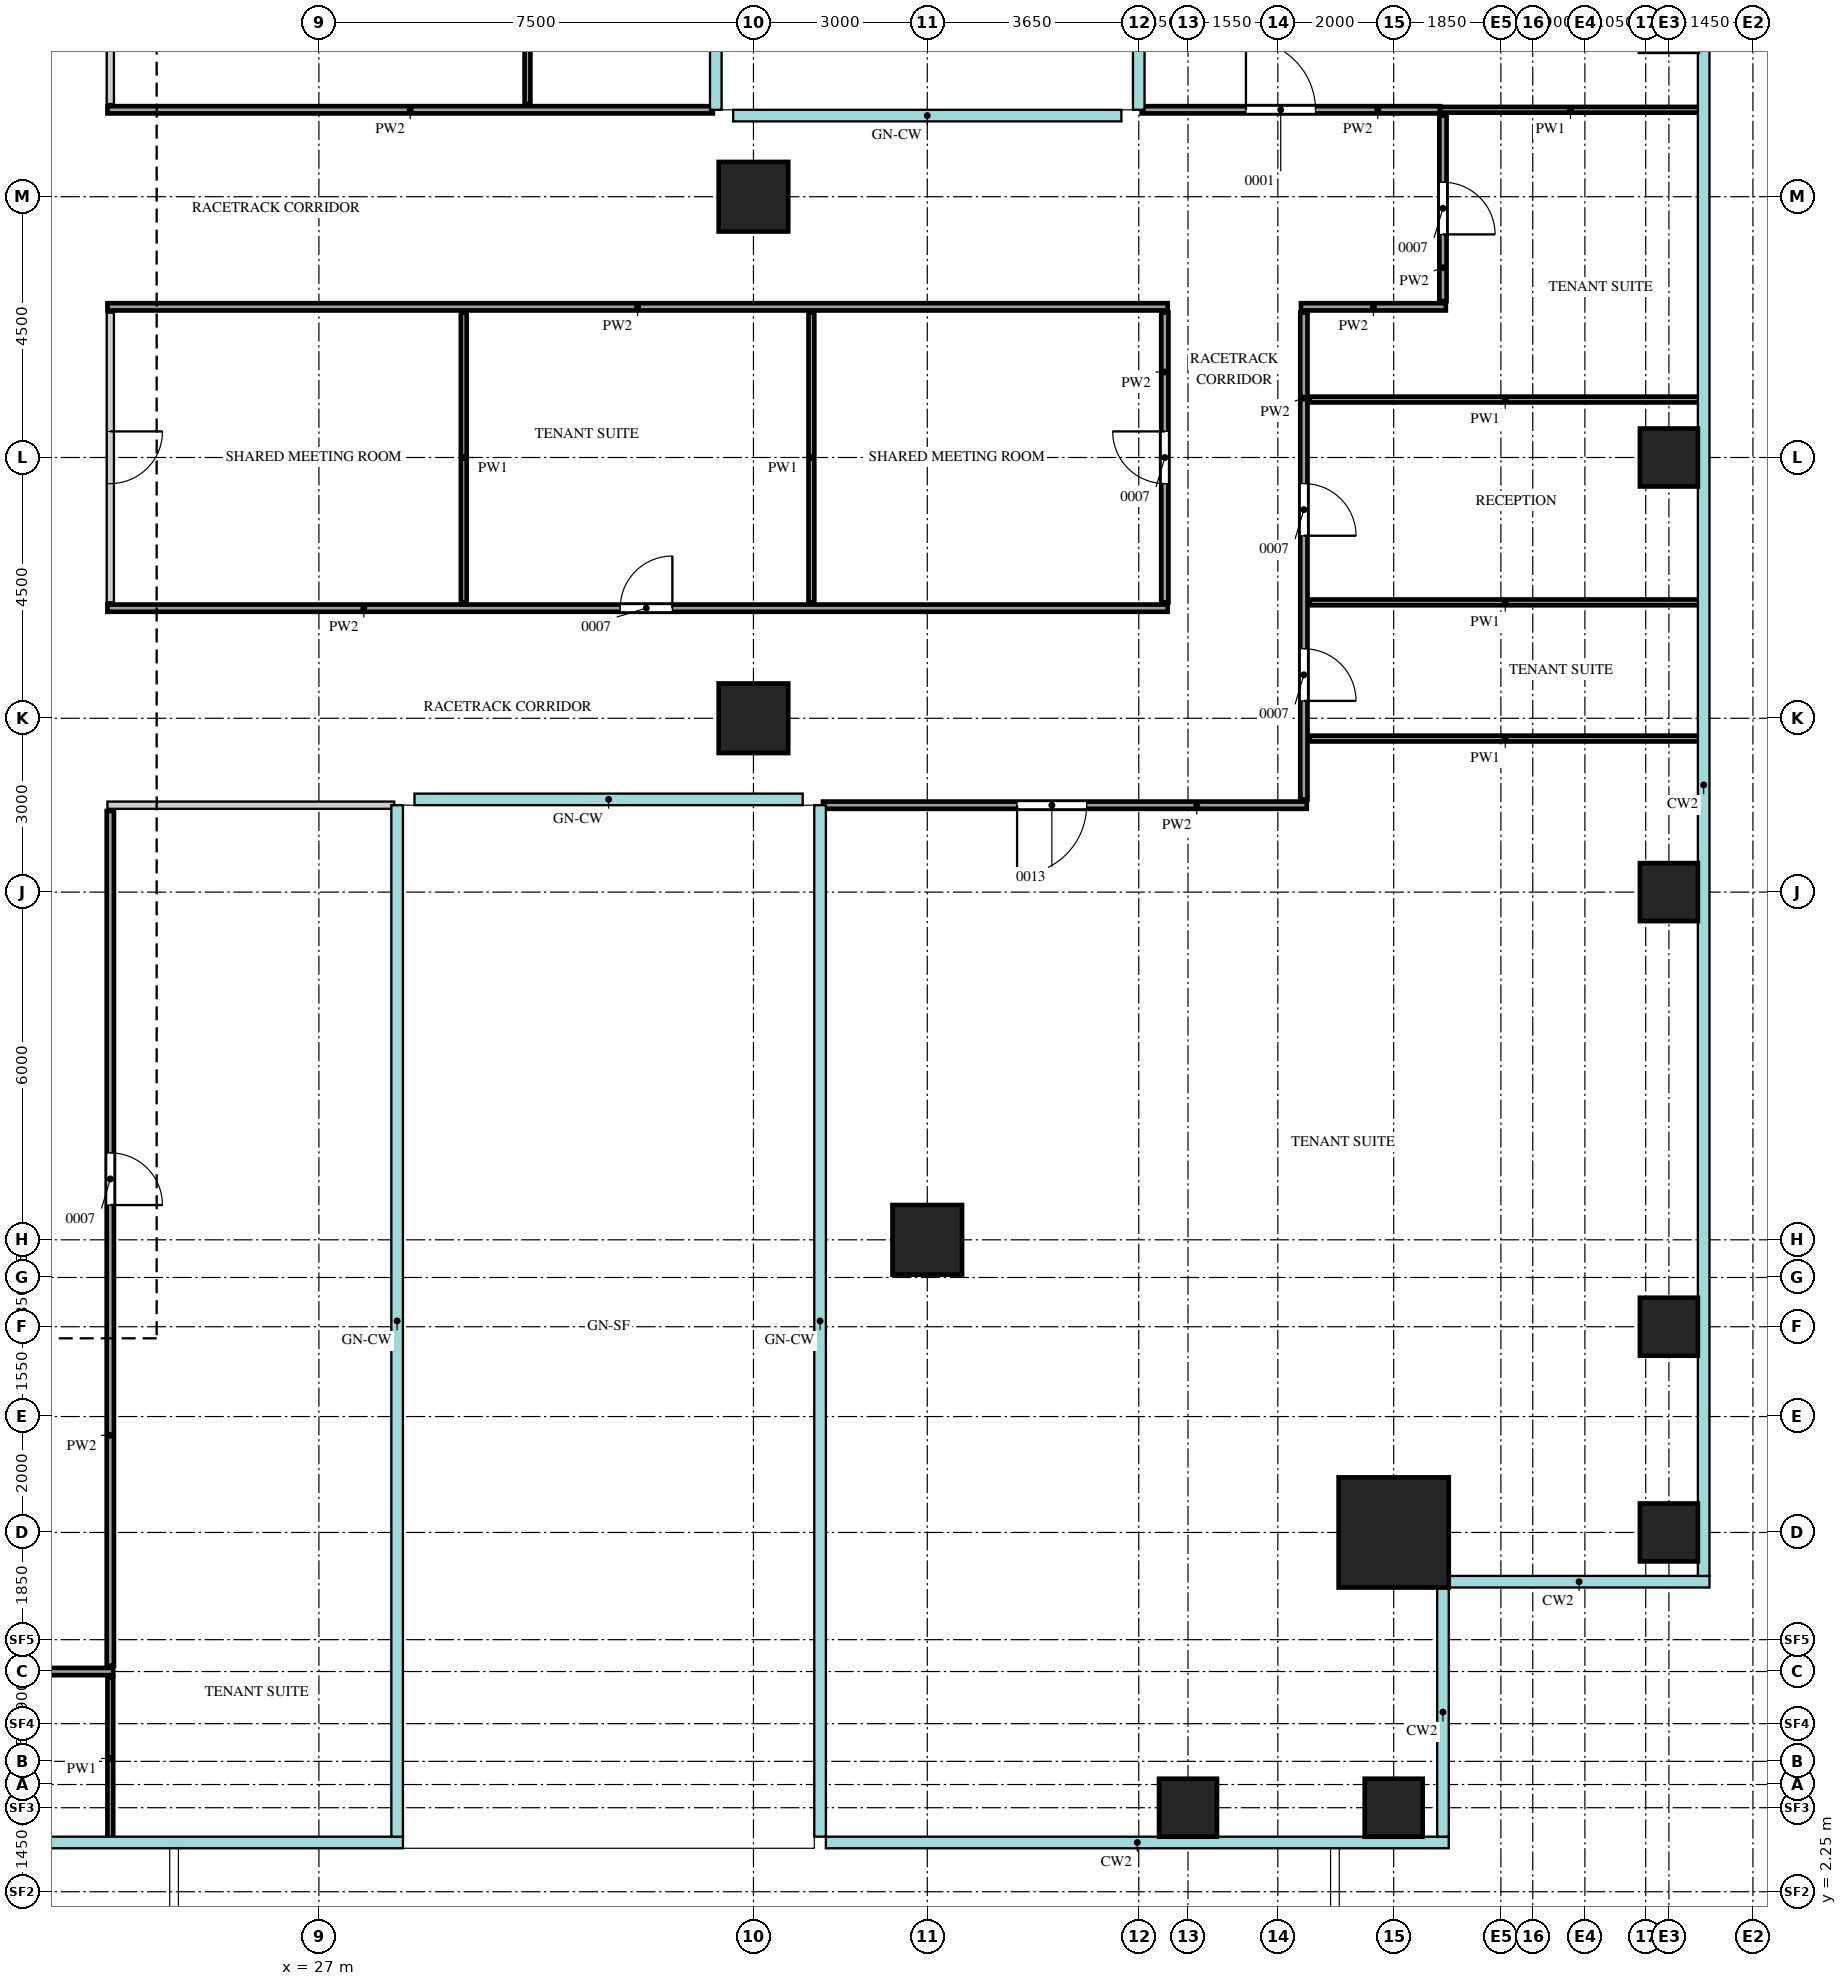
"""IFC4 building model, lengths in metres.
Left out: names, types, materials, properties, quantities, classifications, styles, units other than length and angle.
Written with IfcOpenShell. Run it as: python <this file> out.ifc"""

import sys

from ifc_helpers import new_model, si_unit, direction, frame, frame_2d, origin, origin_2d, place, context, subcontext, project, spatial, rectangle, extrude, source, transform, mapped, element, fill, save


model = new_model("IFC4")
c1 = context("Model", 3, precision=1e-05, world=origin(), true_north=direction((0.0, 1.0)))
c2 = subcontext(c1, "Body", "Model", "MODEL_VIEW")
j1 = project(units=[si_unit("LENGTHUNIT", "METRE"), si_unit("PLANEANGLEUNIT", "RADIAN")], contexts=[c1])
p1 = place(None, origin())
s1 = spatial("IfcSite", under=j1, at=p1, CompositionType="ELEMENT")
p2 = place(p1, origin())
s2 = spatial("IfcBuilding", under=s1, at=p2, CompositionType="ELEMENT")
p3 = place(p2, frame((0.0, 0.0, 184.7)))
s3 = spatial("IfcBuildingStorey", under=s2, at=p3, CompositionType="ELEMENT", Elevation=184.7)
m1 = source(origin(), c2, "Body", "SweptSolid", [
    extrude(rectangle(XDim=1.9, YDim=1.9, at=origin_2d()), origin(), (0.0, 0.0, 1.0), 4.0),
])
p4 = place(p3, frame((45.55, 8.45, 0.0), z_axis=(0.0, 0.0, 1.0), x_axis=(1.0, 0.0, 0.0)))
e1 = element("IfcColumn", 1, at=p4, inside=s3, PredefinedType="COLUMN", context=c2, shape_type="MappedRepresentation", body=[
    mapped(m1, transform((0.0, 0.0, 0.0))),
])
m2 = source(origin(), c2, "Body", "SweptSolid", [
    extrude(rectangle(XDim=1.0, YDim=1.0, at=origin_2d()), origin(), (0.0, 0.0, 1.0), 3.75),
])
for number, where, z_axis, x_axis in (
    (2, (42.0, 3.7, 0.0), (0.0, 0.0, 1.0), (1.0, 0.0, 0.0)),
    (3, (45.55, 3.7, 0.0), (0.0, 0.0, 1.0), (1.0, 0.0, 0.0)),
    (4, (50.3, 8.45, 0.0), (0.0, 0.0, 1.0), (1.0, 0.0, 0.0)),
    (5, (50.3, 12.0, 0.0), (0.0, 0.0, 1.0), (1.0, 0.0, 0.0)),
    (6, (50.3, 19.5, 0.0), (0.0, 0.0, 1.0), (1.0, 0.0, 0.0)),
    (7, (50.3, 27.0, 0.0), (0.0, 0.0, 1.0), (1.0, 0.0, 0.0)),
):
    element("IfcColumn", number, at=place(p3, frame(where, z_axis=z_axis, x_axis=x_axis)), inside=s3, PredefinedType="COLUMN", context=c2, shape_type="MappedRepresentation", body=[
        mapped(m2, transform((0.0, 0.0, 0.0))),
    ])
m3 = source(origin(), c2, "Body", "SweptSolid", [
    extrude(rectangle(XDim=1.2, YDim=1.2, at=origin_2d()), origin(), (0.0, 0.0, 1.0), 3.75),
])
for number, where, z_axis, x_axis in (
    (8, (37.5, 13.5, 0.0), (0.0, 0.0, 1.0), (1.0, 0.0, 0.0)),
    (9, (34.5, 22.5, 0.0), (0.0, 0.0, 1.0), (1.0, 0.0, 0.0)),
    (10, (34.5, 31.5, 0.0), (0.0, 0.0, 1.0), (1.0, 0.0, 0.0)),
):
    element("IfcColumn", number, at=place(p3, frame(where, z_axis=z_axis, x_axis=x_axis)), inside=s3, PredefinedType="COLUMN", context=c2, shape_type="MappedRepresentation", body=[
        mapped(m3, transform((0.0, 0.0, 0.0))),
    ])
m4 = source(origin(), c2, "Body", "SweptSolid", [
    extrude(rectangle(XDim=2.8, YDim=0.1, at=frame_2d((1.4, 0.0))), origin(), (0.0, 0.0, 1.0), 3.8),
])
p5 = place(p3, frame((23.4, 3.15, 0.0), z_axis=(0.0, 0.0, 1.0), x_axis=(0.0, 1.0, 0.0)))
e11 = element("IfcWall", 11, at=p5, inside=s3, PredefinedType="PARTITIONING", context=c2, shape_type="MappedRepresentation", body=[
    mapped(m4, transform((0.0, 0.0, 0.0))),
])
m5 = source(origin(), c2, "Body", "SweptSolid", [
    extrude(rectangle(XDim=15.8, YDim=0.125, at=frame_2d((7.9, 0.0))), origin(), (0.0, 0.0, 1.0), 3.8),
])
p6 = place(p3, frame((7.65, 6.05, 0.0), z_axis=(0.0, 0.0, 1.0), x_axis=(1.0, 0.0, 0.0)))
e12 = element("IfcWall", 12, at=p6, inside=s3, PredefinedType="PARTITIONING", context=c2, shape_type="MappedRepresentation", body=[
    mapped(m5, transform((0.0, 0.0, 0.0))),
])
m6 = source(origin(), c2, "Body", "SweptSolid", [
    extrude(rectangle(XDim=0.9, YDim=2.1, at=frame_2d((0.45, 1.05))), frame((0.0, 0.073, 0.0), z_axis=(0.0, -1.0, 0.0), x_axis=(1.0, 0.0, 0.0)), (0.0, 0.0, 1.0), 0.145),
])
p7 = place(p6, frame((1.8, 0.0, 0.0)))
e13 = element("IfcOpeningElement", 13, at=p7, cuts=e12, PredefinedType="OPENING", context=c2, shape_type="MappedRepresentation", body=[
    mapped(m6, transform((0.0, 0.0, 0.0))),
])
p8 = place(p6, frame((8.85, 0.0, 0.0)))
e14 = element("IfcOpeningElement", 14, at=p8, cuts=e12, PredefinedType="OPENING", context=c2, shape_type="MappedRepresentation", body=[
    mapped(m6, transform((0.0, 0.0, 0.0))),
])
m7 = source(origin(), c2, "Body", "SweptSolid", [
    extrude(rectangle(XDim=14.75, YDim=0.125, at=frame_2d((7.375, 0.0))), origin(), (0.0, 0.0, 1.0), 3.8),
])
p9 = place(p3, frame((23.4, 6.15, 0.0), z_axis=(0.0, 0.0, 1.0), x_axis=(0.0, 1.0, 0.0)))
e15 = element("IfcWall", 15, at=p9, inside=s3, PredefinedType="PARTITIONING", context=c2, shape_type="MappedRepresentation", body=[
    mapped(m7, transform((0.0, 0.0, 0.0))),
])
p10 = place(p9, frame((7.95, 0.0, 0.0)))
e16 = element("IfcOpeningElement", 16, at=p10, cuts=e15, PredefinedType="OPENING", context=c2, shape_type="MappedRepresentation", body=[
    mapped(m6, transform((0.0, 0.0, 0.0))),
])
m8 = source(origin(), c2, "Body", "SweptSolid", [
    extrude(rectangle(XDim=4.95, YDim=0.125, at=frame_2d((2.475, 0.0))), origin(), (0.0, 0.0, 1.0), 3.8),
])
p11 = place(p3, frame((23.35, 21.0, 0.0), z_axis=(0.0, 0.0, 1.0), x_axis=(1.0, 0.0, 0.0)))
e17 = element("IfcWall", 17, at=p11, inside=s3, PredefinedType="PARTITIONING", context=c2, shape_type="MappedRepresentation", body=[
    mapped(m8, transform((0.0, 0.0, 0.0))),
])
m9 = source(origin(), c2, "Body", "SweptSolid", [
    extrude(rectangle(XDim=8.35, YDim=0.125, at=frame_2d((4.175, 0.0))), origin(), (0.0, 0.0, 1.0), 3.8),
])
p12 = place(p3, frame((35.7, 21.0, 0.0), z_axis=(0.0, 0.0, 1.0), x_axis=(1.0, 0.0, 0.0)))
e18 = element("IfcWall", 18, at=p12, inside=s3, PredefinedType="PARTITIONING", context=c2, shape_type="MappedRepresentation", body=[
    mapped(m9, transform((0.0, 0.0, 0.0))),
])
m10 = source(origin(), c2, "Body", "SweptSolid", [
    extrude(rectangle(XDim=1.2, YDim=2.1, at=frame_2d((0.6, 1.05))), frame((0.0, 0.073, 0.0), z_axis=(0.0, -1.0, 0.0), x_axis=(1.0, 0.0, 0.0)), (0.0, 0.0, 1.0), 0.145),
])
p13 = place(p12, frame((3.35, 0.0, 0.0)))
e19 = element("IfcOpeningElement", 19, at=p13, cuts=e18, PredefinedType="OPENING", context=c2, shape_type="MappedRepresentation", body=[
    mapped(m10, transform((0.0, 0.0, 0.0))),
])
m11 = source(origin(), c2, "Body", "SweptSolid", [
    extrude(rectangle(XDim=8.4, YDim=0.125, at=frame_2d((4.2, 0.0))), origin(), (0.0, 0.0, 1.0), 3.8),
])
p14 = place(p3, frame((44.0, 21.1, 0.0), z_axis=(0.0, 0.0, 1.0), x_axis=(0.0, 1.0, 0.0)))
e20 = element("IfcWall", 20, at=p14, inside=s3, PredefinedType="PARTITIONING", context=c2, shape_type="MappedRepresentation", body=[
    mapped(m11, transform((0.0, 0.0, 0.0))),
])
p15 = place(p14, frame((1.7, 0.0, 0.0)))
e21 = element("IfcOpeningElement", 21, at=p15, cuts=e20, PredefinedType="OPENING", context=c2, shape_type="MappedRepresentation", body=[
    mapped(m6, transform((0.0, 0.0, 0.0))),
])
p16 = place(p14, frame((4.55, 0.0, 0.0)))
e22 = element("IfcOpeningElement", 22, at=p16, cuts=e20, PredefinedType="OPENING", context=c2, shape_type="MappedRepresentation", body=[
    mapped(m6, transform((0.0, 0.0, 0.0))),
])
m12 = source(origin(), c2, "Body", "SweptSolid", [
    extrude(rectangle(XDim=6.75, YDim=0.1, at=frame_2d((3.375, 0.0))), origin(), (0.0, 0.0, 1.0), 3.8),
])
p17 = place(p3, frame((44.1, 22.15, 0.0), z_axis=(0.0, 0.0, 1.0), x_axis=(1.0, 0.0, 0.0)))
e23 = element("IfcWall", 23, at=p17, inside=s3, PredefinedType="PARTITIONING", context=c2, shape_type="MappedRepresentation", body=[
    mapped(m12, transform((0.0, 0.0, 0.0))),
])
m13 = source(origin(), c2, "Body", "SweptSolid", [
    extrude(rectangle(XDim=18.3, YDim=0.125, at=frame_2d((9.15, 0.0))), origin(), (0.0, 0.0, 1.0), 3.8),
])
p18 = place(p3, frame((23.35, 24.4, 0.0), z_axis=(0.0, 0.0, 1.0), x_axis=(1.0, 0.0, 0.0)))
e24 = element("IfcWall", 24, at=p18, inside=s3, PredefinedType="PARTITIONING", context=c2, shape_type="MappedRepresentation", body=[
    mapped(m13, transform((0.0, 0.0, 0.0))),
])
p19 = place(p18, frame((8.85, 0.0, 0.0)))
e25 = element("IfcOpeningElement", 25, at=p19, cuts=e24, PredefinedType="OPENING", context=c2, shape_type="MappedRepresentation", body=[
    mapped(m6, transform((0.0, 0.0, 0.0))),
])
m14 = source(origin(), c2, "Body", "SweptSolid", [
    extrude(rectangle(XDim=5.0, YDim=0.125, at=frame_2d((2.5, 0.0))), origin(), (0.0, 0.0, 1.0), 3.8),
])
p20 = place(p3, frame((23.4, 24.5, 0.0), z_axis=(0.0, 0.0, 1.0), x_axis=(0.0, 1.0, 0.0)))
e26 = element("IfcWall", 26, at=p20, inside=s3, PredefinedType="PARTITIONING", context=c2, shape_type="MappedRepresentation", body=[
    mapped(m14, transform((0.0, 0.0, 0.0))),
])
p21 = place(p20, frame((2.05, 0.0, 0.0)))
e27 = element("IfcOpeningElement", 27, at=p21, cuts=e26, PredefinedType="OPENING", context=c2, shape_type="MappedRepresentation", body=[
    mapped(m6, transform((0.0, 0.0, 0.0))),
])
m15 = source(origin(), c2, "Body", "SweptSolid", [
    extrude(rectangle(XDim=5.0, YDim=0.1, at=frame_2d((2.5, 0.0))), origin(), (0.0, 0.0, 1.0), 3.8),
])
for number, where, z_axis, x_axis in (
    (28, (29.5, 24.5, 0.0), (0.0, 0.0, 1.0), (0.0, 1.0, 0.0)),
    (29, (35.5, 24.5, 0.0), (0.0, 0.0, 1.0), (0.0, 1.0, 0.0)),
):
    element("IfcWall", number, at=place(p3, frame(where, z_axis=z_axis, x_axis=x_axis)), inside=s3, PredefinedType="PARTITIONING", context=c2, shape_type="MappedRepresentation", body=[
        mapped(m15, transform((0.0, 0.0, 0.0))),
    ])
p22 = place(p3, frame((41.6, 24.5, 0.0), z_axis=(0.0, 0.0, 1.0), x_axis=(0.0, 1.0, 0.0)))
e30 = element("IfcWall", 30, at=p22, inside=s3, PredefinedType="PARTITIONING", context=c2, shape_type="MappedRepresentation", body=[
    mapped(m14, transform((0.0, 0.0, 0.0))),
])
p23 = place(p22, frame((2.05, 0.0, 0.0)))
e31 = element("IfcOpeningElement", 31, at=p23, cuts=e30, PredefinedType="OPENING", context=c2, shape_type="MappedRepresentation", body=[
    mapped(m6, transform((0.0, 0.0, 0.0))),
])
for number, where, z_axis, x_axis in (
    (32, (44.1, 24.5, 0.0), (0.0, 0.0, 1.0), (1.0, 0.0, 0.0)),
    (33, (44.1, 28.0, 0.0), (0.0, 0.0, 1.0), (1.0, 0.0, 0.0)),
):
    element("IfcWall", number, at=place(p3, frame(where, z_axis=z_axis, x_axis=x_axis)), inside=s3, PredefinedType="PARTITIONING", context=c2, shape_type="MappedRepresentation", body=[
        mapped(m12, transform((0.0, 0.0, 0.0))),
    ])
p24 = place(p3, frame((23.35, 29.6, 0.0), z_axis=(0.0, 0.0, 1.0), x_axis=(1.0, 0.0, 0.0)))
e34 = element("IfcWall", 34, at=p24, inside=s3, PredefinedType="PARTITIONING", context=c2, shape_type="MappedRepresentation", body=[
    mapped(m13, transform((0.0, 0.0, 0.0))),
])
m16 = source(origin(), c2, "Body", "SweptSolid", [
    extrude(rectangle(XDim=2.5, YDim=0.125, at=frame_2d((1.25, 0.0))), origin(), (0.0, 0.0, 1.0), 3.8),
])
p25 = place(p3, frame((43.95, 29.6, 0.0), z_axis=(0.0, 0.0, 1.0), x_axis=(1.0, 0.0, 0.0)))
e35 = element("IfcWall", 35, at=p25, inside=s3, PredefinedType="PARTITIONING", context=c2, shape_type="MappedRepresentation", body=[
    mapped(m16, transform((0.0, 0.0, 0.0))),
])
m17 = source(origin(), c2, "Body", "SweptSolid", [
    extrude(rectangle(XDim=3.2, YDim=0.125, at=frame_2d((1.6, 0.0))), origin(), (0.0, 0.0, 1.0), 3.8),
])
p26 = place(p3, frame((46.4, 29.7, 0.0), z_axis=(0.0, 0.0, 1.0), x_axis=(0.0, 1.0, 0.0)))
e36 = element("IfcWall", 36, at=p26, inside=s3, PredefinedType="PARTITIONING", context=c2, shape_type="MappedRepresentation", body=[
    mapped(m17, transform((0.0, 0.0, 0.0))),
])
p27 = place(p26, frame((1.15, 0.0, 0.0)))
e37 = element("IfcOpeningElement", 37, at=p27, cuts=e36, PredefinedType="OPENING", context=c2, shape_type="MappedRepresentation", body=[
    mapped(m6, transform((0.0, 0.0, 0.0))),
])
m18 = source(origin(), c2, "Body", "SweptSolid", [
    extrude(rectangle(XDim=10.45, YDim=0.125, at=frame_2d((5.225, 0.0))), origin(), (0.0, 0.0, 1.0), 3.8),
])
p28 = place(p3, frame((23.35, 33.0, 0.0), z_axis=(0.0, 0.0, 1.0), x_axis=(1.0, 0.0, 0.0)))
e38 = element("IfcWall", 38, at=p28, inside=s3, PredefinedType="PARTITIONING", context=c2, shape_type="MappedRepresentation", body=[
    mapped(m18, transform((0.0, 0.0, 0.0))),
])
m19 = source(origin(), c2, "Body", "SweptSolid", [
    extrude(rectangle(XDim=5.15, YDim=0.125, at=frame_2d((2.575, 0.0))), origin(), (0.0, 0.0, 1.0), 3.8),
])
p29 = place(p3, frame((41.2, 33.0, 0.0), z_axis=(0.0, 0.0, 1.0), x_axis=(1.0, 0.0, 0.0)))
e39 = element("IfcWall", 39, at=p29, inside=s3, PredefinedType="PARTITIONING", context=c2, shape_type="MappedRepresentation", body=[
    mapped(m19, transform((0.0, 0.0, 0.0))),
])
p30 = place(p29, frame((1.8, 0.0, 0.0)))
e40 = element("IfcOpeningElement", 40, at=p30, cuts=e39, PredefinedType="OPENING", context=c2, shape_type="MappedRepresentation", body=[
    mapped(m10, transform((0.0, 0.0, 0.0))),
])
m20 = source(origin(), c2, "Body", "SweptSolid", [
    extrude(rectangle(XDim=4.5, YDim=0.1, at=frame_2d((2.25, 0.0))), origin(), (0.0, 0.0, 1.0), 3.8),
])
p31 = place(p3, frame((46.35, 33.0, 0.0), z_axis=(0.0, 0.0, 1.0), x_axis=(1.0, 0.0, 0.0)))
e41 = element("IfcWall", 41, at=p31, inside=s3, PredefinedType="PARTITIONING", context=c2, shape_type="MappedRepresentation", body=[
    mapped(m20, transform((0.0, 0.0, 0.0))),
])
m21 = source(origin(), c2, "Body", "SweptSolid", [
    extrude(rectangle(XDim=6.3, YDim=0.125, at=frame_2d((3.15, 0.0))), origin(), (0.0, 0.0, 1.0), 3.8),
])
p32 = place(p3, frame((23.4, 33.1, 0.0), z_axis=(0.0, 0.0, 1.0), x_axis=(0.0, 1.0, 0.0)))
e42 = element("IfcWall", 42, at=p32, inside=s3, PredefinedType="PARTITIONING", context=c2, shape_type="MappedRepresentation", body=[
    mapped(m21, transform((0.0, 0.0, 0.0))),
])
m22 = source(origin(), c2, "Body", "SweptSolid", [
    extrude(rectangle(XDim=6.3, YDim=0.1, at=frame_2d((3.15, 0.0))), origin(), (0.0, 0.0, 1.0), 3.8),
])
p33 = place(p3, frame((30.6, 33.1, 0.0), z_axis=(0.0, 0.0, 1.0), x_axis=(0.0, 1.0, 0.0)))
e43 = element("IfcWall", 43, at=p33, inside=s3, PredefinedType="PARTITIONING", context=c2, shape_type="MappedRepresentation", body=[
    mapped(m22, transform((0.0, 0.0, 0.0))),
])
m23 = source(origin(), c2, "Body", "SweptSolid", [
    extrude(rectangle(XDim=0.9, YDim=2.1, at=frame_2d((0.45, 1.05))), frame((0.0, 0.025, 0.0), z_axis=(0.0, -1.0, 0.0), x_axis=(1.0, 0.0, 0.0)), (0.0, 0.0, 1.0), 0.05),
])
p34 = place(p10, origin())
e44 = element("IfcDoor", 44, at=p34, inside=s3, OperationType="SINGLE_SWING_LEFT", PredefinedType="DOOR", context=c2, shape_type="MappedRepresentation", body=[
    mapped(m23, transform((0.0, 0.0, 0.0))),
])
fill(e16, e44)
m24 = source(origin(), c2, "Body", "SweptSolid", [
    extrude(rectangle(XDim=1.2, YDim=2.1, at=frame_2d((0.6, 1.05))), frame((0.0, 0.025, 0.0), z_axis=(0.0, -1.0, 0.0), x_axis=(1.0, 0.0, 0.0)), (0.0, 0.0, 1.0), 0.05),
])
p35 = place(p13, origin())
e45 = element("IfcDoor", 45, at=p35, inside=s3, OperationType="SINGLE_SWING_LEFT", PredefinedType="DOOR", context=c2, shape_type="MappedRepresentation", body=[
    mapped(m24, transform((0.0, 0.0, 0.0))),
])
fill(e19, e45)
p36 = place(p30, origin())
e46 = element("IfcDoor", 46, at=p36, inside=s3, OperationType="SINGLE_SWING_RIGHT", PredefinedType="DOOR", context=c2, shape_type="MappedRepresentation", body=[
    mapped(m24, transform((0.0, 0.0, 0.0))),
])
fill(e40, e46)
p37 = place(p15, origin())
e47 = element("IfcDoor", 47, at=p37, inside=s3, OperationType="SINGLE_SWING_LEFT", PredefinedType="DOOR", context=c2, shape_type="MappedRepresentation", body=[
    mapped(m23, transform((0.0, 0.0, 0.0))),
])
fill(e21, e47)
p38 = place(p16, origin())
e48 = element("IfcDoor", 48, at=p38, inside=s3, OperationType="SINGLE_SWING_LEFT", PredefinedType="DOOR", context=c2, shape_type="MappedRepresentation", body=[
    mapped(m23, transform((0.0, 0.0, 0.0))),
])
fill(e22, e48)
p39 = place(p27, origin())
e49 = element("IfcDoor", 49, at=p39, inside=s3, OperationType="SINGLE_SWING_LEFT", PredefinedType="DOOR", context=c2, shape_type="MappedRepresentation", body=[
    mapped(m23, transform((0.0, 0.0, 0.0))),
])
fill(e37, e49)
p40 = place(p21, origin())
e50 = element("IfcDoor", 50, at=p40, inside=s3, OperationType="SINGLE_SWING_RIGHT", PredefinedType="DOOR", context=c2, shape_type="MappedRepresentation", body=[
    mapped(m23, transform((0.0, 0.0, 0.0))),
])
fill(e27, e50)
p41 = place(p19, origin())
e51 = element("IfcDoor", 51, at=p41, inside=s3, OperationType="SINGLE_SWING_LEFT", PredefinedType="DOOR", context=c2, shape_type="MappedRepresentation", body=[
    mapped(m23, transform((0.0, 0.0, 0.0))),
])
fill(e25, e51)
p42 = place(p23, origin())
e52 = element("IfcDoor", 52, at=p42, inside=s3, OperationType="SINGLE_SWING_LEFT", PredefinedType="DOOR", context=c2, shape_type="MappedRepresentation", body=[
    mapped(m23, transform((0.0, 0.0, 0.0))),
])
fill(e31, e52)
save(model, sys.argv[1])
